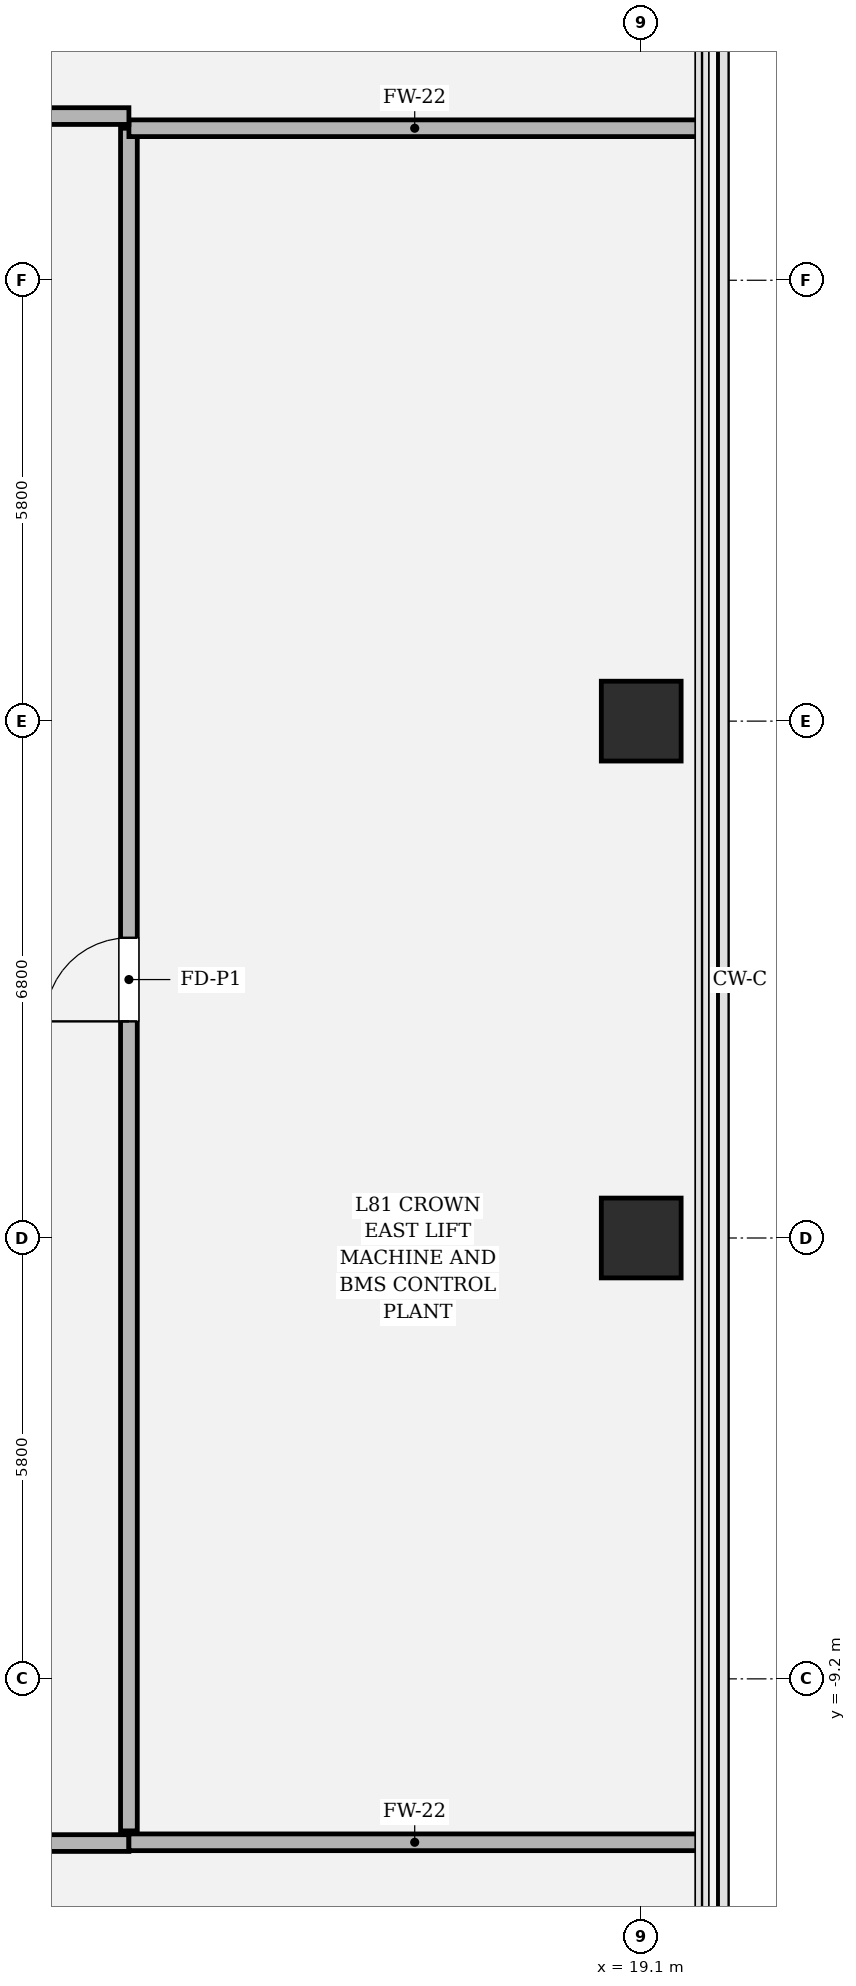
"""IFC4 building model, lengths in metres.
Left out: names, types, materials, properties, quantities, classifications, styles, units other than length and angle.
Written with IfcOpenShell. Run it as: python <this file> out.ifc"""

import sys

from ifc_helpers import new_model, si_unit, direction, frame, frame_2d, origin, origin_2d, place, context, subcontext, project, spatial, rectangle, hollow_rectangle, extrude, element, fill, save


model = new_model("IFC4")
c1 = context("Model", 3, precision=1e-05, world=origin(), true_north=direction((0.0, 1.0)))
c2 = subcontext(c1, "Body", "Model", "MODEL_VIEW")
j1 = project(units=[si_unit("LENGTHUNIT", "METRE"), si_unit("PLANEANGLEUNIT", "RADIAN")], contexts=[c1])
p1 = place(None, origin())
s1 = spatial("IfcSite", under=j1, at=p1, CompositionType="ELEMENT")
p2 = place(p1, origin())
s2 = spatial("IfcBuilding", under=s1, at=p2, CompositionType="ELEMENT")
p3 = place(p2, frame((0.0, 0.0, 343.8)))
s3 = spatial("IfcBuildingStorey", under=s2, at=p3, CompositionType="ELEMENT", Elevation=343.8)
for number, where, z_axis, x_axis in (
    (1, (19.1, -3.4, 0.0), (0.0, 0.0, 1.0), (1.0, 0.0, 0.0)),
    (2, (19.1, 3.4, 0.0), (0.0, 0.0, 1.0), (1.0, 0.0, 0.0)),
):
    element("IfcColumn", number, at=place(p3, frame(where, z_axis=z_axis, x_axis=x_axis)), inside=s3, PredefinedType="COLUMN", context=c2, shape_type="SweptSolid", body=[
        extrude(hollow_rectangle(XDim=1.05, YDim=1.05, WallThickness=0.03, at=origin_2d()), origin(), (0.0, 0.0, 1.0), 4.5),
    ])
p4 = place(p3, frame((-12.36, -11.36, 0.0), z_axis=(0.0, 0.0, 1.0), x_axis=(1.0, 0.0, 0.0)))
e3 = element("IfcWall", 3, at=p4, inside=s3, PredefinedType="SOLIDWALL", context=c2, shape_type="SweptSolid", body=[
    extrude(rectangle(XDim=24.72, YDim=0.22, at=frame_2d((12.36, 0.0))), origin(), (0.0, 0.0, 1.0), 2.954),
])
p5 = place(p4, frame((11.81, 0.0, 0.0)))
e4 = element("IfcOpeningElement", 4, at=p5, cuts=e3, PredefinedType="OPENING", context=c2, shape_type="SweptSolid", body=[
    extrude(rectangle(XDim=1.1, YDim=2.2, at=frame_2d((0.55, 1.1))), frame((0.0, 0.12, 0.0), z_axis=(0.0, -1.0, 0.0), x_axis=(1.0, 0.0, 0.0)), (0.0, 0.0, 1.0), 0.24),
])
p6 = place(p3, frame((12.36, -11.35, 0.0), z_axis=(0.0, 0.0, 1.0), x_axis=(1.0, 0.0, 0.0)))
e5 = element("IfcWall", 5, at=p6, inside=s3, PredefinedType="SOLIDWALL", context=c2, shape_type="SweptSolid", body=[
    extrude(rectangle(XDim=7.52, YDim=0.22, at=frame_2d((3.76, 0.0))), origin(), (0.0, 0.0, 1.0), 2.954),
])
p7 = place(p3, frame((12.36, -11.2, 0.0), z_axis=(0.0, 0.0, 1.0), x_axis=(0.0, 1.0, 0.0)))
e6 = element("IfcWall", 6, at=p7, inside=s3, PredefinedType="SOLIDWALL", context=c2, shape_type="SweptSolid", body=[
    extrude(rectangle(XDim=22.4, YDim=0.22, at=frame_2d((11.2, 0.0))), origin(), (0.0, 0.0, 1.0), 2.954),
])
p8 = place(p7, frame((10.65, 0.0, 0.0)))
e7 = element("IfcOpeningElement", 7, at=p8, cuts=e6, PredefinedType="OPENING", context=c2, shape_type="SweptSolid", body=[
    extrude(rectangle(XDim=1.1, YDim=2.2, at=frame_2d((0.55, 1.1))), frame((0.0, 0.12, 0.0), z_axis=(0.0, -1.0, 0.0), x_axis=(1.0, 0.0, 0.0)), (0.0, 0.0, 1.0), 0.24),
])
p9 = place(p3, frame((12.36, 11.2, 0.0), z_axis=(0.0, 0.0, 1.0), x_axis=(1.0, 0.0, 0.0)))
e8 = element("IfcWall", 8, at=p9, inside=s3, PredefinedType="SOLIDWALL", context=c2, shape_type="SweptSolid", body=[
    extrude(rectangle(XDim=7.52, YDim=0.22, at=frame_2d((3.76, 0.0))), origin(), (0.0, 0.0, 1.0), 2.954),
])
p10 = place(p3, frame((12.36, 11.36, 0.0), z_axis=(0.0, 0.0, 1.0), x_axis=(-1.0, 0.0, 0.0)))
e9 = element("IfcWall", 9, at=p10, inside=s3, PredefinedType="SOLIDWALL", context=c2, shape_type="SweptSolid", body=[
    extrude(rectangle(XDim=24.72, YDim=0.22, at=frame_2d((12.36, 0.0))), origin(), (0.0, 0.0, 1.0), 2.954),
])
p11 = place(p10, frame((11.81, 0.0, 0.0)))
e10 = element("IfcOpeningElement", 10, at=p11, cuts=e9, PredefinedType="OPENING", context=c2, shape_type="SweptSolid", body=[
    extrude(rectangle(XDim=1.1, YDim=2.2, at=frame_2d((0.55, 1.1))), frame((0.0, 0.12, 0.0), z_axis=(0.0, -1.0, 0.0), x_axis=(1.0, 0.0, 0.0)), (0.0, 0.0, 1.0), 0.24),
])
p12 = place(p8, origin())
e11 = element("IfcDoor", 11, at=p12, inside=s3, OperationType="SINGLE_SWING_LEFT", PredefinedType="DOOR", context=c2, shape_type="SweptSolid", body=[
    extrude(rectangle(XDim=1.1, YDim=2.2, at=frame_2d((0.55, 1.1))), frame((0.0, 0.025, 0.0), z_axis=(0.0, -1.0, 0.0), x_axis=(1.0, 0.0, 0.0)), (0.0, 0.0, 1.0), 0.05),
])
fill(e7, e11)
save(model, sys.argv[1])
